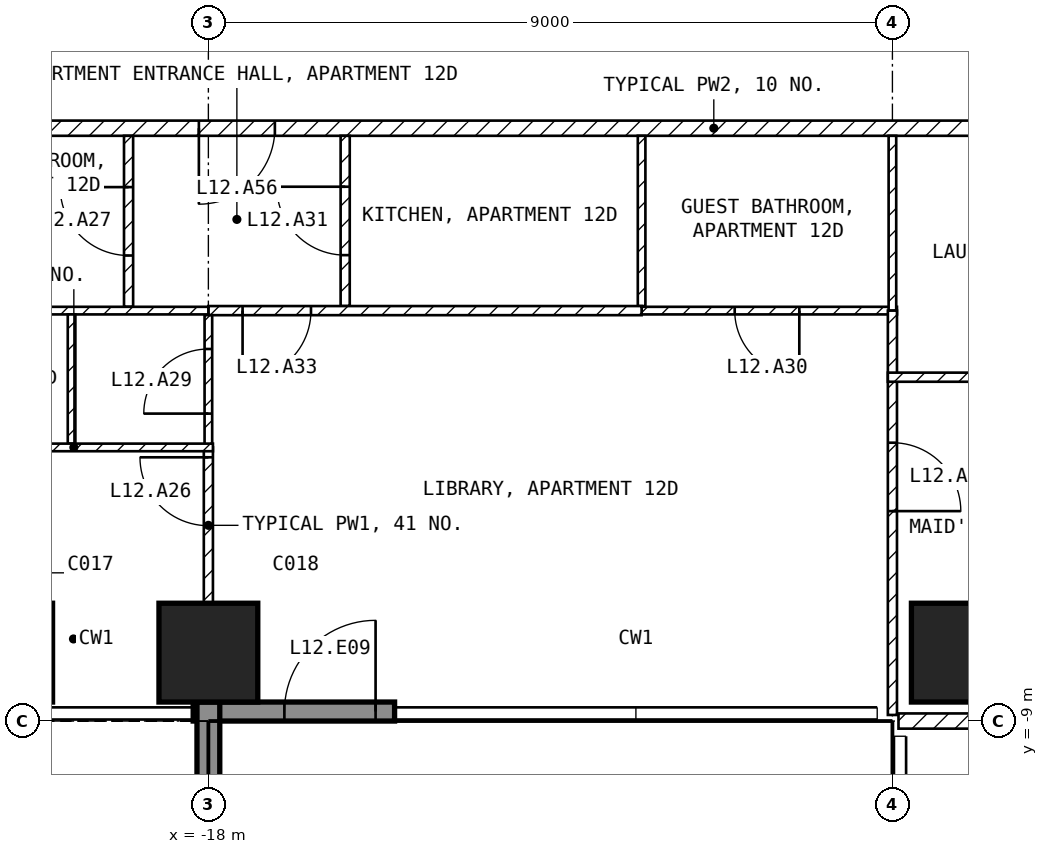
"""IFC4 building model, lengths in metres.
Left out: names, types, materials, properties, quantities, classifications, styles, units other than length and angle.
Written with IfcOpenShell. Run it as: python <this file> out.ifc"""

import sys

from ifc_helpers import new_model, si_unit, direction, frame, frame_2d, origin, origin_2d, place, context, subcontext, project, spatial, rectangle, extrude, element, fill, save


model = new_model("IFC4")
c1 = context("Model", 3, precision=1e-05, world=origin(), true_north=direction((0.0, 1.0)))
c2 = subcontext(c1, "Body", "Model", "MODEL_VIEW")
j1 = project(units=[si_unit("LENGTHUNIT", "METRE"), si_unit("PLANEANGLEUNIT", "RADIAN")], contexts=[c1])
p1 = place(None, origin())
s1 = spatial("IfcSite", under=j1, at=p1, CompositionType="ELEMENT")
p2 = place(p1, origin())
s2 = spatial("IfcBuilding", under=s1, at=p2, CompositionType="ELEMENT")
p3 = place(p2, frame((0.0, 0.0, 61.0)))
s3 = spatial("IfcBuildingStorey", under=s2, at=p3, CompositionType="ELEMENT", Elevation=61.0)
for number, where, z_axis, x_axis in (
    (1, (-20.7, -8.1, -0.25), (0.0, 0.0, 1.0), (1.0, 0.0, 0.0)),
    (2, (-18.0, -8.1, -0.25), (0.0, 0.0, 1.0), (1.0, 0.0, 0.0)),
    (3, (-8.1, -8.1, -0.25), (0.0, 0.0, 1.0), (1.0, 0.0, 0.0)),
):
    element("IfcColumn", number, at=place(p3, frame(where, z_axis=z_axis, x_axis=x_axis)), inside=s3, PredefinedType="COLUMN", context=c2, shape_type="SweptSolid", body=[
        extrude(rectangle(XDim=1.3, YDim=1.3, at=origin_2d()), origin(), (0.0, 0.0, 1.0), 3.5),
    ])
p4 = place(p3, frame((-18.2, -8.875, 0.0), z_axis=(0.0, 0.0, 1.0), x_axis=(1.0, 0.0, 0.0)))
e4 = element("IfcWall", 4, at=p4, inside=s3, PredefinedType="SOLIDWALL", context=c2, shape_type="SweptSolid", body=[
    extrude(rectangle(XDim=2.65, YDim=0.25, at=frame_2d((1.325, 0.0))), origin(), (0.0, 0.0, 1.0), 3.25),
])
p5 = place(p4, frame((1.2, 0.0, 0.0)))
e5 = element("IfcOpeningElement", 5, at=p5, cuts=e4, PredefinedType="OPENING", context=c2, shape_type="SweptSolid", body=[
    extrude(rectangle(XDim=1.2, YDim=2.4, at=frame_2d((0.6, 1.2))), frame((0.0, 0.135, 0.0), z_axis=(0.0, -1.0, 0.0), x_axis=(1.0, 0.0, 0.0)), (0.0, 0.0, 1.0), 0.27),
])
p6 = place(p3, frame((-18.0, -8.75, 0.0), z_axis=(0.0, 0.0, 1.0), x_axis=(0.0, -1.0, 0.0)))
e6 = element("IfcWall", 6, at=p6, inside=s3, PredefinedType="SOLIDWALL", context=c2, shape_type="SweptSolid", body=[
    extrude(rectangle(XDim=2.95, YDim=0.3, at=frame_2d((1.475, 0.0))), origin(), (0.0, 0.0, 1.0), 3.25),
])
p7 = place(p3, frame((-1.1, -1.2, 0.0), z_axis=(0.0, 0.0, 1.0), x_axis=(-1.0, 0.0, 0.0)))
e7 = element("IfcWall", 7, at=p7, inside=s3, PredefinedType="PARTITIONING", context=c2, shape_type="SweptSolid", body=[
    extrude(rectangle(XDim=20.5, YDim=0.2, at=frame_2d((10.25, 0.0))), origin(), (0.0, 0.0, 1.0), 3.25),
])
p8 = place(p7, frame((16.025, 0.0, 0.0)))
e8 = element("IfcOpeningElement", 8, at=p8, cuts=e7, PredefinedType="OPENING", context=c2, shape_type="SweptSolid", body=[
    extrude(rectangle(XDim=1.0, YDim=2.1, at=frame_2d((0.5, 1.05))), frame((0.0, 0.11, 0.0), z_axis=(0.0, -1.0, 0.0), x_axis=(1.0, 0.0, 0.0)), (0.0, 0.0, 1.0), 0.22),
])
p9 = place(p3, frame((8.92, -9.0, 0.0), z_axis=(0.0, 0.0, 1.0), x_axis=(-1.0, 0.0, 0.0)))
e9 = element("IfcWall", 9, at=p9, inside=s3, PredefinedType="PARTITIONING", context=c2, shape_type="SweptSolid", body=[
    extrude(rectangle(XDim=17.84, YDim=0.2, at=frame_2d((8.92, 0.0))), origin(), (0.0, 0.0, 1.0), 3.25),
])
p10 = place(p9, frame((8.42, 0.0, 0.0)))
e10 = element("IfcOpeningElement", 10, at=p10, cuts=e9, PredefinedType="OPENING", context=c2, shape_type="SweptSolid", body=[
    extrude(rectangle(XDim=1.0, YDim=2.1, at=frame_2d((0.5, 1.05))), frame((0.0, 0.11, 0.0), z_axis=(0.0, -1.0, 0.0), x_axis=(1.0, 0.0, 0.0)), (0.0, 0.0, 1.0), 0.22),
])
p11 = place(p3, frame((-12.3, -3.54, 0.0), z_axis=(0.0, 0.0, 1.0), x_axis=(0.0, 1.0, 0.0)))
e11 = element("IfcWall", 11, at=p11, inside=s3, PredefinedType="PARTITIONING", context=c2, shape_type="SweptSolid", body=[
    extrude(rectangle(XDim=2.24, YDim=0.1, at=frame_2d((1.12, 0.0))), origin(), (0.0, 0.0, 1.0), 3.25),
])
p12 = place(p3, frame((-8.94, -3.6, 0.0), z_axis=(0.0, 0.0, 1.0), x_axis=(-1.0, 0.0, 0.0)))
e12 = element("IfcWall", 12, at=p12, inside=s3, PredefinedType="PARTITIONING", context=c2, shape_type="SweptSolid", body=[
    extrude(rectangle(XDim=3.36, YDim=0.1, at=frame_2d((1.68, 0.0))), origin(), (0.0, 0.0, 1.0), 3.25),
])
p13 = place(p12, frame((1.285, 0.0, 0.0)))
e13 = element("IfcOpeningElement", 13, at=p13, cuts=e12, PredefinedType="OPENING", context=c2, shape_type="SweptSolid", body=[
    extrude(rectangle(XDim=0.85, YDim=2.1, at=frame_2d((0.425, 1.05))), frame((0.0, 0.06, 0.0), z_axis=(0.0, -1.0, 0.0), x_axis=(1.0, 0.0, 0.0)), (0.0, 0.0, 1.0), 0.12),
])
p14 = place(p3, frame((-9.0, -1.3, 0.0), z_axis=(0.0, 0.0, 1.0), x_axis=(0.0, -1.0, 0.0)))
e14 = element("IfcWall", 14, at=p14, inside=s3, PredefinedType="PARTITIONING", context=c2, shape_type="SweptSolid", body=[
    extrude(rectangle(XDim=2.3, YDim=0.1, at=frame_2d((1.15, 0.0))), origin(), (0.0, 0.0, 1.0), 3.25),
])
p15 = place(p3, frame((-16.2, -3.54, 0.0), z_axis=(0.0, 0.0, 1.0), x_axis=(0.0, 1.0, 0.0)))
e15 = element("IfcWall", 15, at=p15, inside=s3, PredefinedType="PARTITIONING", context=c2, shape_type="SweptSolid", body=[
    extrude(rectangle(XDim=2.24, YDim=0.12, at=frame_2d((1.12, 0.0))), origin(), (0.0, 0.0, 1.0), 3.25),
])
p16 = place(p15, frame((0.67, 0.0, 0.0)))
e16 = element("IfcOpeningElement", 16, at=p16, cuts=e15, PredefinedType="OPENING", context=c2, shape_type="SweptSolid", body=[
    extrude(rectangle(XDim=0.9, YDim=2.1, at=frame_2d((0.45, 1.05))), frame((0.0, 0.07, 0.0), z_axis=(0.0, -1.0, 0.0), x_axis=(1.0, 0.0, 0.0)), (0.0, 0.0, 1.0), 0.14),
])
p17 = place(p3, frame((-12.3, -3.6, 0.0), z_axis=(0.0, 0.0, 1.0), x_axis=(-1.0, 0.0, 0.0)))
e17 = element("IfcWall", 17, at=p17, inside=s3, PredefinedType="PARTITIONING", context=c2, shape_type="SweptSolid", body=[
    extrude(rectangle(XDim=5.7, YDim=0.12, at=frame_2d((2.85, 0.0))), origin(), (0.0, 0.0, 1.0), 3.25),
])
p18 = place(p17, frame((4.35, 0.0, 0.0)))
e18 = element("IfcOpeningElement", 18, at=p18, cuts=e17, PredefinedType="OPENING", context=c2, shape_type="SweptSolid", body=[
    extrude(rectangle(XDim=0.9, YDim=2.1, at=frame_2d((0.45, 1.05))), frame((0.0, 0.07, 0.0), z_axis=(0.0, -1.0, 0.0), x_axis=(1.0, 0.0, 0.0)), (0.0, 0.0, 1.0), 0.14),
])
p19 = place(p3, frame((-19.05, -3.55, 0.0), z_axis=(0.0, 0.0, 1.0), x_axis=(0.0, 1.0, 0.0)))
e19 = element("IfcWall", 19, at=p19, inside=s3, PredefinedType="PARTITIONING", context=c2, shape_type="SweptSolid", body=[
    extrude(rectangle(XDim=2.25, YDim=0.12, at=frame_2d((1.125, 0.0))), origin(), (0.0, 0.0, 1.0), 3.25),
])
p20 = place(p19, frame((0.675, 0.0, 0.0)))
e20 = element("IfcOpeningElement", 20, at=p20, cuts=e19, PredefinedType="OPENING", context=c2, shape_type="SweptSolid", body=[
    extrude(rectangle(XDim=0.9, YDim=2.1, at=frame_2d((0.45, 1.05))), frame((0.0, 0.07, 0.0), z_axis=(0.0, -1.0, 0.0), x_axis=(1.0, 0.0, 0.0)), (0.0, 0.0, 1.0), 0.14),
])
p21 = place(p3, frame((-18.0, -3.6, 0.0), z_axis=(0.0, 0.0, 1.0), x_axis=(-1.0, 0.0, 0.0)))
e21 = element("IfcWall", 21, at=p21, inside=s3, PredefinedType="PARTITIONING", context=c2, shape_type="SweptSolid", body=[
    extrude(rectangle(XDim=3.6, YDim=0.1, at=frame_2d((1.8, 0.0))), origin(), (0.0, 0.0, 1.0), 3.25),
])
p22 = place(p3, frame((-18.0, -5.4, 0.0), z_axis=(0.0, 0.0, 1.0), x_axis=(0.0, 1.0, 0.0)))
e22 = element("IfcWall", 22, at=p22, inside=s3, PredefinedType="PARTITIONING", context=c2, shape_type="SweptSolid", body=[
    extrude(rectangle(XDim=1.74, YDim=0.1, at=frame_2d((0.87, 0.0))), origin(), (0.0, 0.0, 1.0), 2.346),
])
p23 = place(p22, frame((0.445, 0.0, 0.0)))
e23 = element("IfcOpeningElement", 23, at=p23, cuts=e22, PredefinedType="OPENING", context=c2, shape_type="SweptSolid", body=[
    extrude(rectangle(XDim=0.85, YDim=2.1, at=frame_2d((0.425, 1.05))), frame((0.0, 0.06, 0.0), z_axis=(0.0, -1.0, 0.0), x_axis=(1.0, 0.0, 0.0)), (0.0, 0.0, 1.0), 0.12),
])
p24 = place(p3, frame((-18.0, -7.45, 0.0), z_axis=(0.0, 0.0, 1.0), x_axis=(0.0, 1.0, 0.0)))
e24 = element("IfcWall", 24, at=p24, inside=s3, PredefinedType="PARTITIONING", context=c2, shape_type="SweptSolid", body=[
    extrude(rectangle(XDim=2.05, YDim=0.12, at=frame_2d((1.025, 0.0))), origin(), (0.0, 0.0, 1.0), 2.346),
])
p25 = place(p24, frame((1.02, 0.0, 0.0)))
e25 = element("IfcOpeningElement", 25, at=p25, cuts=e24, PredefinedType="OPENING", context=c2, shape_type="SweptSolid", body=[
    extrude(rectangle(XDim=0.9, YDim=2.1, at=frame_2d((0.45, 1.05))), frame((0.0, 0.07, 0.0), z_axis=(0.0, -1.0, 0.0), x_axis=(1.0, 0.0, 0.0)), (0.0, 0.0, 1.0), 0.14),
])
p26 = place(p3, frame((-9.0, -3.6, 0.0), z_axis=(0.0, 0.0, 1.0), x_axis=(0.0, -1.0, 0.0)))
e26 = element("IfcWall", 26, at=p26, inside=s3, PredefinedType="PARTITIONING", context=c2, shape_type="SweptSolid", body=[
    extrude(rectangle(XDim=5.32, YDim=0.12, at=frame_2d((2.66, 0.0))), origin(), (0.0, 0.0, 1.0), 3.25),
])
p27 = place(p26, frame((1.738, 0.0, 0.0)))
e27 = element("IfcOpeningElement", 27, at=p27, cuts=e26, PredefinedType="OPENING", context=c2, shape_type="SweptSolid", body=[
    extrude(rectangle(XDim=0.9, YDim=2.1, at=frame_2d((0.45, 1.05))), frame((0.0, 0.07, 0.0), z_axis=(0.0, -1.0, 0.0), x_axis=(1.0, 0.0, 0.0)), (0.0, 0.0, 1.0), 0.14),
])
p28 = place(p3, frame((-19.8, -5.35, 0.0), z_axis=(0.0, 0.0, 1.0), x_axis=(0.0, 1.0, 0.0)))
e28 = element("IfcWall", 28, at=p28, inside=s3, PredefinedType="PARTITIONING", context=c2, shape_type="SweptSolid", body=[
    extrude(rectangle(XDim=1.7, YDim=0.1, at=frame_2d((0.85, 0.0))), origin(), (0.0, 0.0, 1.0), 3.25),
])
p29 = place(p3, frame((-17.94, -5.4, 0.0), z_axis=(0.0, 0.0, 1.0), x_axis=(-1.0, 0.0, 0.0)))
e29 = element("IfcWall", 29, at=p29, inside=s3, PredefinedType="PARTITIONING", context=c2, shape_type="SweptSolid", body=[
    extrude(rectangle(XDim=3.66, YDim=0.1, at=frame_2d((1.83, 0.0))), origin(), (0.0, 0.0, 1.0), 3.25),
])
p30 = place(p29, frame((2.335, 0.0, 0.0)))
e30 = element("IfcOpeningElement", 30, at=p30, cuts=e29, PredefinedType="OPENING", context=c2, shape_type="SweptSolid", body=[
    extrude(rectangle(XDim=0.85, YDim=2.1, at=frame_2d((0.425, 1.05))), frame((0.0, 0.06, 0.0), z_axis=(0.0, -1.0, 0.0), x_axis=(1.0, 0.0, 0.0)), (0.0, 0.0, 1.0), 0.12),
])
p31 = place(p3, frame((-4.44, -4.476, 0.0), z_axis=(0.0, 0.0, 1.0), x_axis=(-1.0, 0.0, 0.0)))
e31 = element("IfcWall", 31, at=p31, inside=s3, PredefinedType="PARTITIONING", context=c2, shape_type="SweptSolid", body=[
    extrude(rectangle(XDim=4.62, YDim=0.12, at=frame_2d((2.31, 0.0))), origin(), (0.0, 0.0, 1.0), 3.25),
])
p32 = place(p31, frame((1.86, 0.0, 0.0)))
e32 = element("IfcOpeningElement", 32, at=p32, cuts=e31, PredefinedType="OPENING", context=c2, shape_type="SweptSolid", body=[
    extrude(rectangle(XDim=0.9, YDim=2.1, at=frame_2d((0.45, 1.05))), frame((0.0, 0.07, 0.0), z_axis=(0.0, -1.0, 0.0), x_axis=(1.0, 0.0, 0.0)), (0.0, 0.0, 1.0), 0.14),
])
p33 = place(p5, origin())
e33 = element("IfcDoor", 33, at=p33, inside=s3, OperationType="SINGLE_SWING_RIGHT", PredefinedType="DOOR", context=c2, shape_type="SweptSolid", body=[
    extrude(rectangle(XDim=1.2, YDim=2.4, at=frame_2d((0.6, 1.2))), frame((0.0, 0.025, 0.0), z_axis=(0.0, -1.0, 0.0), x_axis=(1.0, 0.0, 0.0)), (0.0, 0.0, 1.0), 0.05),
])
fill(e5, e33)
p34 = place(p25, origin())
e34 = element("IfcDoor", 34, at=p34, inside=s3, OperationType="SINGLE_SWING_RIGHT", PredefinedType="DOOR", context=c2, shape_type="SweptSolid", body=[
    extrude(rectangle(XDim=0.9, YDim=2.1, at=frame_2d((0.45, 1.05))), frame((0.0, 0.025, 0.0), z_axis=(0.0, -1.0, 0.0), x_axis=(1.0, 0.0, 0.0)), (0.0, 0.0, 1.0), 0.05),
])
fill(e25, e34)
p35 = place(p20, origin())
e35 = element("IfcDoor", 35, at=p35, inside=s3, OperationType="SINGLE_SWING_RIGHT", PredefinedType="DOOR", context=c2, shape_type="SweptSolid", body=[
    extrude(rectangle(XDim=0.9, YDim=2.1, at=frame_2d((0.45, 1.05))), frame((0.0, 0.025, 0.0), z_axis=(0.0, -1.0, 0.0), x_axis=(1.0, 0.0, 0.0)), (0.0, 0.0, 1.0), 0.05),
])
fill(e20, e35)
p36 = place(p23, origin())
e36 = element("IfcDoor", 36, at=p36, inside=s3, OperationType="SINGLE_SWING_LEFT", PredefinedType="DOOR", context=c2, shape_type="SweptSolid", body=[
    extrude(rectangle(XDim=0.85, YDim=2.1, at=frame_2d((0.425, 1.05))), frame((0.0, 0.025, 0.0), z_axis=(0.0, -1.0, 0.0), x_axis=(1.0, 0.0, 0.0)), (0.0, 0.0, 1.0), 0.05),
])
fill(e23, e36)
p37 = place(p13, origin())
e37 = element("IfcDoor", 37, at=p37, inside=s3, OperationType="SINGLE_SWING_LEFT", PredefinedType="DOOR", context=c2, shape_type="SweptSolid", body=[
    extrude(rectangle(XDim=0.85, YDim=2.1, at=frame_2d((0.425, 1.05))), frame((0.0, 0.025, 0.0), z_axis=(0.0, -1.0, 0.0), x_axis=(1.0, 0.0, 0.0)), (0.0, 0.0, 1.0), 0.05),
])
fill(e13, e37)
p38 = place(p16, origin())
e38 = element("IfcDoor", 38, at=p38, inside=s3, OperationType="SINGLE_SWING_RIGHT", PredefinedType="DOOR", context=c2, shape_type="SweptSolid", body=[
    extrude(rectangle(XDim=0.9, YDim=2.1, at=frame_2d((0.45, 1.05))), frame((0.0, 0.025, 0.0), z_axis=(0.0, -1.0, 0.0), x_axis=(1.0, 0.0, 0.0)), (0.0, 0.0, 1.0), 0.05),
])
fill(e16, e38)
p39 = place(p18, origin())
e39 = element("IfcDoor", 39, at=p39, inside=s3, OperationType="SINGLE_SWING_RIGHT", PredefinedType="DOOR", context=c2, shape_type="SweptSolid", body=[
    extrude(rectangle(XDim=0.9, YDim=2.1, at=frame_2d((0.45, 1.05))), frame((0.0, 0.025, 0.0), z_axis=(0.0, -1.0, 0.0), x_axis=(1.0, 0.0, 0.0)), (0.0, 0.0, 1.0), 0.05),
])
fill(e18, e39)
p40 = place(p27, origin())
e40 = element("IfcDoor", 40, at=p40, inside=s3, OperationType="SINGLE_SWING_RIGHT", PredefinedType="DOOR", context=c2, shape_type="SweptSolid", body=[
    extrude(rectangle(XDim=0.9, YDim=2.1, at=frame_2d((0.45, 1.05))), frame((0.0, 0.025, 0.0), z_axis=(0.0, -1.0, 0.0), x_axis=(1.0, 0.0, 0.0)), (0.0, 0.0, 1.0), 0.05),
])
fill(e27, e40)
p41 = place(p8, origin())
e41 = element("IfcDoor", 41, at=p41, inside=s3, OperationType="SINGLE_SWING_RIGHT", PredefinedType="DOOR", context=c2, shape_type="SweptSolid", body=[
    extrude(rectangle(XDim=1.0, YDim=2.1, at=frame_2d((0.5, 1.05))), frame((0.0, 0.025, 0.0), z_axis=(0.0, -1.0, 0.0), x_axis=(1.0, 0.0, 0.0)), (0.0, 0.0, 1.0), 0.05),
])
fill(e8, e41)
save(model, sys.argv[1])
